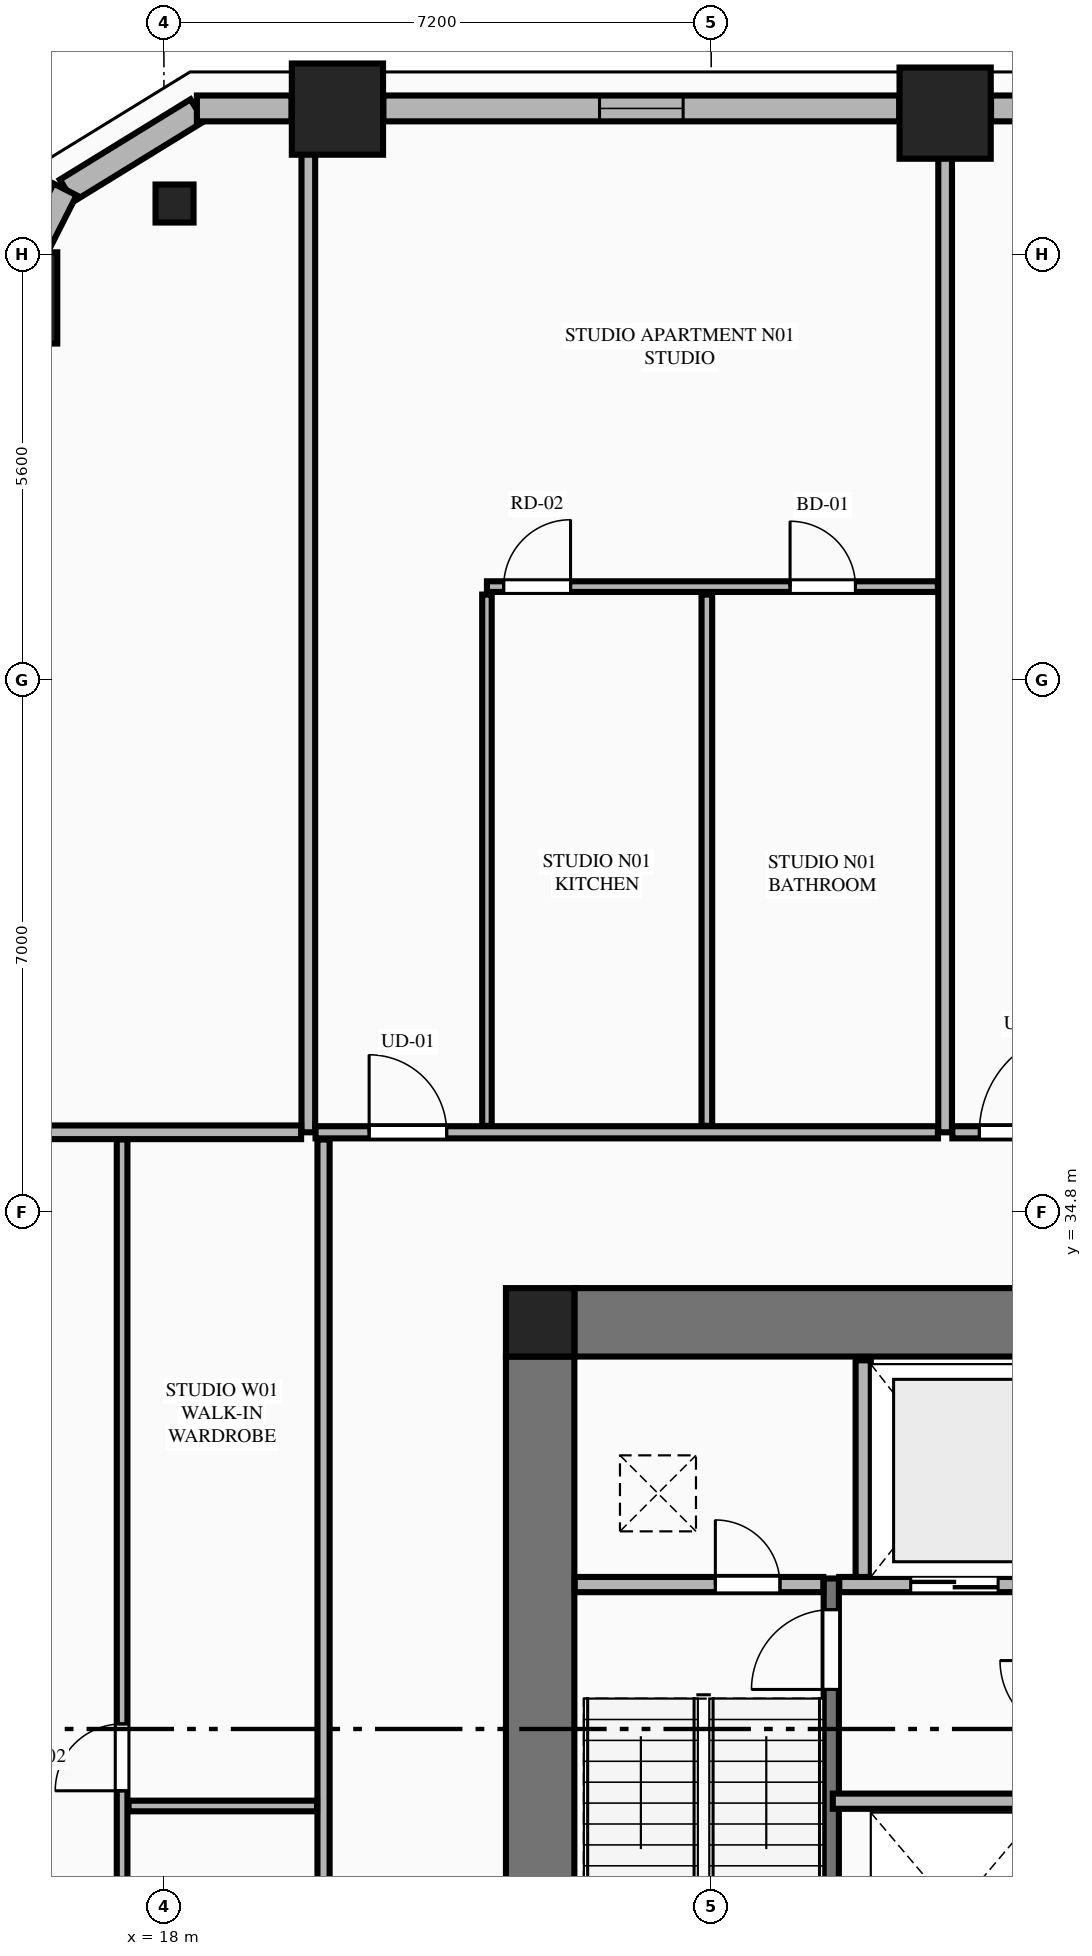
"""IFC4 building model, lengths in metres.
Left out: names, types, materials, properties, quantities, classifications, styles, units other than length and angle.
Written with IfcOpenShell. Run it as: python <this file> out.ifc"""

import sys

from ifc_helpers import new_model, si_unit, direction, frame, frame_2d, origin, origin_2d, place, context, subcontext, project, spatial, rectangle, extrude, element, fill, save


model = new_model("IFC4")
c1 = context("Model", 3, precision=1e-05, world=origin(), true_north=direction((0.0, 1.0)))
c2 = subcontext(c1, "Body", "Model", "MODEL_VIEW")
j1 = project(units=[si_unit("LENGTHUNIT", "METRE"), si_unit("PLANEANGLEUNIT", "RADIAN")], contexts=[c1])
p1 = place(None, origin())
s1 = spatial("IfcSite", under=j1, at=p1, CompositionType="ELEMENT")
p2 = place(p1, origin())
s2 = spatial("IfcBuilding", under=s1, at=p2, CompositionType="ELEMENT")
p3 = place(p2, frame((0.0, 0.0, 60.4)))
s3 = spatial("IfcBuildingStorey", under=s2, at=p3, CompositionType="ELEMENT", Elevation=60.4)
p4 = place(p3, frame((22.95, 33.35, 0.0), z_axis=(0.0, 0.0, 1.0), x_axis=(1.0, 0.0, 0.0)))
e1 = element("IfcColumn", 1, at=p4, inside=s3, PredefinedType="COLUMN", context=c2, shape_type="SweptSolid", body=[
    extrude(rectangle(XDim=0.9, YDim=0.9, at=origin_2d()), origin(), (0.0, 0.0, 1.0), 3.55),
])
p5 = place(p3, frame((23.4, 33.35, 0.0), z_axis=(0.0, 0.0, 1.0), x_axis=(1.0, 0.0, 0.0)))
e2 = element("IfcWall", 2, at=p5, inside=s3, PredefinedType="SHEAR", context=c2, shape_type="SweptSolid", body=[
    extrude(rectangle(XDim=18.0, YDim=0.9, at=frame_2d((9.0, 0.0))), origin(), (0.0, 0.0, 1.0), 3.33),
])
p6 = place(p3, frame((22.95, 18.9, 0.0), z_axis=(0.0, 0.0, 1.0), x_axis=(0.0, 1.0, 0.0)))
e3 = element("IfcWall", 3, at=p6, inside=s3, PredefinedType="SHEAR", context=c2, shape_type="SweptSolid", body=[
    extrude(rectangle(XDim=14.0, YDim=0.9, at=frame_2d((7.0, 0.0))), origin(), (0.0, 0.0, 1.0), 3.33),
])
p7 = place(p6, frame((2.94, 0.0, 0.0)))
e4 = element("IfcOpeningElement", 4, at=p7, cuts=e3, PredefinedType="OPENING", context=c2, shape_type="SweptSolid", body=[
    extrude(rectangle(XDim=1.22, YDim=2.25, at=frame_2d((0.61, 1.125))), frame((0.0, 0.46, 0.0), z_axis=(0.0, -1.0, 0.0), x_axis=(1.0, 0.0, 0.0)), (0.0, 0.0, 1.0), 0.92),
])
for number, where, z_axis, x_axis in (
    (5, (28.278, 49.258, 0.0), (0.0, 0.0, 1.0), (1.0, 0.0, 0.0)),
    (6, (20.283, 49.311, 0.0), (0.0, 0.0, 1.0), (1.0, 0.0, 0.0)),
    (7, (15.997, 46.827, 0.0), (0.0, 0.0, 1.0), (1.0, 0.0, 0.0)),
):
    element("IfcColumn", number, at=place(p3, frame(where, z_axis=z_axis, x_axis=x_axis)), inside=s3, PredefinedType="COLUMN", context=c2, shape_type="SweptSolid", body=[
        extrude(rectangle(XDim=1.2, YDim=1.2, at=origin_2d()), origin(), (0.0, 0.0, 1.0), 3.55),
    ])
p8 = place(p3, frame((18.14, 48.069, 0.0), z_axis=(0.0, 0.0, 1.0), x_axis=(-0.865195182343, -0.501435236546, 0.0)))
e8 = element("IfcColumn", 8, at=p8, inside=s3, PredefinedType="PILASTER", context=c2, shape_type="SweptSolid", body=[
    extrude(rectangle(XDim=0.5, YDim=0.35, at=origin_2d()), origin(), (0.0, 0.0, 1.0), 3.55),
])
p9 = place(p3, frame((26.78, 23.2, 0.0), z_axis=(0.0, 0.0, 1.0), x_axis=(0.0, 1.0, 0.0)))
e9 = element("IfcWall", 9, at=p9, inside=s3, PredefinedType="SHEAR", context=c2, shape_type="SweptSolid", body=[
    extrude(rectangle(XDim=6.78, YDim=0.2, at=frame_2d((3.39, 0.0))), origin(), (0.0, 0.0, 1.0), 3.55),
])
p10 = place(p9, frame((5.32, 0.0, 0.0)))
e10 = element("IfcOpeningElement", 10, at=p10, cuts=e9, PredefinedType="OPENING", context=c2, shape_type="SweptSolid", body=[
    extrude(rectangle(XDim=1.05, YDim=2.15, at=frame_2d((0.525, 1.075))), frame((0.0, 0.11, 0.0), z_axis=(0.0, -1.0, 0.0), x_axis=(1.0, 0.0, 0.0)), (0.0, 0.0, 1.0), 0.22),
])
p11 = place(p3, frame((23.405, 29.9, 0.0), z_axis=(0.0, 0.0, 1.0), x_axis=(1.0, 0.0, 0.0)))
e11 = element("IfcWall", 11, at=p11, inside=s3, PredefinedType="PLUMBINGWALL", context=c2, shape_type="SweptSolid", body=[
    extrude(rectangle(XDim=3.27, YDim=0.2, at=frame_2d((1.635, 0.0))), origin(), (0.0, 0.0, 1.0), 3.33),
])
p12 = place(p11, frame((1.85, 0.0, 0.0)))
e12 = element("IfcOpeningElement", 12, at=p12, cuts=e11, PredefinedType="OPENING", context=c2, shape_type="SweptSolid", body=[
    extrude(rectangle(XDim=0.85, YDim=2.05, at=frame_2d((0.425, 1.025))), frame((0.0, 0.11, 0.0), z_axis=(0.0, -1.0, 0.0), x_axis=(1.0, 0.0, 0.0)), (0.0, 0.0, 1.0), 0.22),
])
p13 = place(p3, frame((26.885, 29.9, 0.0), z_axis=(0.0, 0.0, 1.0), x_axis=(1.0, 0.0, 0.0)))
e13 = element("IfcWall", 13, at=p13, inside=s3, PredefinedType="PLUMBINGWALL", context=c2, shape_type="SweptSolid", body=[
    extrude(rectangle(XDim=3.015, YDim=0.2, at=frame_2d((1.507, 0.0))), origin(), (0.0, 0.0, 1.0), 3.33),
])
p14 = place(p13, frame((0.94, 0.0, 0.0)))
e14 = element("IfcOpeningElement", 14, at=p14, cuts=e13, PredefinedType="OPENING", context=c2, shape_type="SweptSolid", body=[
    extrude(rectangle(XDim=1.15, YDim=2.2, at=frame_2d((0.575, 1.1))), frame((0.0, 0.11, 0.0), z_axis=(0.0, -1.0, 0.0), x_axis=(1.0, 0.0, 0.0)), (0.0, 0.0, 1.0), 0.22),
])
p15 = place(p3, frame((27.2, 30.0, 0.0), z_axis=(0.0, 0.0, 1.0), x_axis=(0.0, 1.0, 0.0)))
e15 = element("IfcWall", 15, at=p15, inside=s3, PredefinedType="PLUMBINGWALL", context=c2, shape_type="SweptSolid", body=[
    extrude(rectangle(XDim=2.85, YDim=0.2, at=frame_2d((1.425, 0.0))), origin(), (0.0, 0.0, 1.0), 3.33),
])
p16 = place(p3, frame((26.8, 27.05, 0.0), z_axis=(0.0, 0.0, 1.0), x_axis=(1.0, 0.0, 0.0)))
e16 = element("IfcWall", 16, at=p16, inside=s3, PredefinedType="PLUMBINGWALL", context=c2, shape_type="SweptSolid", body=[
    extrude(rectangle(XDim=3.2, YDim=0.2, at=frame_2d((1.6, 0.0))), origin(), (0.0, 0.0, 1.0), 3.33),
])
p17 = place(p3, frame((18.439, 49.295, 0.0), z_axis=(0.0, 0.0, 1.0), x_axis=(-0.851870104345, -0.523753114857, 0.0)))
e17 = element("IfcWall", 17, at=p17, inside=s3, PredefinedType="STANDARD", context=c2, shape_type="SweptSolid", body=[
    extrude(rectangle(XDim=2.018, YDim=0.34, at=frame_2d((1.009, 0.0))), origin(), (0.0, 0.0, 1.0), 3.33),
])
p18 = place(p3, frame((35.918, 49.32, 0.0), z_axis=(0.0, 0.0, 1.0), x_axis=(-1.0, 0.0, 0.0)))
e18 = element("IfcWall", 18, at=p18, inside=s3, PredefinedType="STANDARD", context=c2, shape_type="SweptSolid", body=[
    extrude(rectangle(XDim=7.036, YDim=0.34, at=frame_2d((3.518, 0.0))), origin(), (0.0, 0.0, 1.0), 2.787),
])
p19 = place(p18, frame((2.968, 0.0, 0.75)))
e19 = element("IfcOpeningElement", 19, at=p19, cuts=e18, PredefinedType="OPENING", context=c2, shape_type="SweptSolid", body=[
    extrude(rectangle(XDim=1.1, YDim=1.887, at=frame_2d((0.55, 0.943))), frame((0.0, 0.18, 0.0), z_axis=(0.0, -1.0, 0.0), x_axis=(1.0, 0.0, 0.0)), (0.0, 0.0, 1.0), 0.36),
])
p20 = place(p3, frame((27.674, 49.32, 0.0), z_axis=(0.0, 0.0, 1.0), x_axis=(-1.0, 0.0, 0.0)))
e20 = element("IfcWall", 20, at=p20, inside=s3, PredefinedType="STANDARD", context=c2, shape_type="SweptSolid", body=[
    extrude(rectangle(XDim=6.787, YDim=0.34, at=frame_2d((3.394, 0.0))), origin(), (0.0, 0.0, 1.0), 2.787),
])
p21 = place(p20, frame((2.843, 0.0, 0.75)))
e21 = element("IfcOpeningElement", 21, at=p21, cuts=e20, PredefinedType="OPENING", context=c2, shape_type="SweptSolid", body=[
    extrude(rectangle(XDim=1.1, YDim=1.887, at=frame_2d((0.55, 0.943))), frame((0.0, 0.18, 0.0), z_axis=(0.0, -1.0, 0.0), x_axis=(1.0, 0.0, 0.0)), (0.0, 0.0, 1.0), 0.36),
])
p22 = place(p3, frame((19.679, 49.32, 0.0), z_axis=(0.0, 0.0, 1.0), x_axis=(-1.0, 0.0, 0.0)))
e22 = element("IfcWall", 22, at=p22, inside=s3, PredefinedType="STANDARD", context=c2, shape_type="SweptSolid", body=[
    extrude(rectangle(XDim=1.245, YDim=0.34, at=frame_2d((0.623, 0.0))), origin(), (0.0, 0.0, 1.0), 3.33),
])
p23 = place(p3, frame((16.7, 48.254, 0.0), z_axis=(0.0, 0.0, 1.0), x_axis=(-0.451995771866, -0.892020079491, 0.0)))
e23 = element("IfcWall", 23, at=p23, inside=s3, PredefinedType="STANDARD", context=c2, shape_type="SweptSolid", body=[
    extrude(rectangle(XDim=0.836, YDim=0.34, at=frame_2d((0.418, 0.0))), origin(), (0.0, 0.0, 1.0), 3.33),
])
p24 = place(p3, frame((19.9, 35.85, 0.0), z_axis=(0.0, 0.0, 1.0), x_axis=(0.0, 1.0, 0.0)))
e24 = element("IfcWall", 24, at=p24, inside=s3, PredefinedType="PARTITIONING", context=c2, shape_type="SweptSolid", body=[
    extrude(rectangle(XDim=13.295, YDim=0.18, at=frame_2d((6.647, 0.0))), origin(), (0.0, 0.0, 1.0), 3.33),
])
p25 = place(p3, frame((28.278, 35.85, 0.0), z_axis=(0.0, 0.0, 1.0), x_axis=(0.0, 1.0, 0.0)))
e25 = element("IfcWall", 25, at=p25, inside=s3, PredefinedType="PARTITIONING", context=c2, shape_type="SweptSolid", body=[
    extrude(rectangle(XDim=13.295, YDim=0.18, at=frame_2d((6.647, 0.0))), origin(), (0.0, 0.0, 1.0), 2.636),
])
p26 = place(p3, frame((19.995, 35.85, 0.0), z_axis=(0.0, 0.0, 1.0), x_axis=(1.0, 0.0, 0.0)))
e26 = element("IfcWall", 26, at=p26, inside=s3, PredefinedType="PARTITIONING", context=c2, shape_type="SweptSolid", body=[
    extrude(rectangle(XDim=8.188, YDim=0.16, at=frame_2d((4.094, 0.0))), origin(), (0.0, 0.0, 1.0), 3.33),
])
p27 = place(p26, frame((0.705, 0.0, 0.0)))
e27 = element("IfcOpeningElement", 27, at=p27, cuts=e26, PredefinedType="OPENING", context=c2, shape_type="SweptSolid", body=[
    extrude(rectangle(XDim=1.02, YDim=2.25, at=frame_2d((0.51, 1.125))), frame((0.0, 0.09, 0.0), z_axis=(0.0, -1.0, 0.0), x_axis=(1.0, 0.0, 0.0)), (0.0, 0.0, 1.0), 0.18),
])
p28 = place(p3, frame((22.25, 35.935, 0.0), z_axis=(0.0, 0.0, 1.0), x_axis=(0.0, 1.0, 0.0)))
e28 = element("IfcWall", 28, at=p28, inside=s3, PredefinedType="PARTITIONING", context=c2, shape_type="SweptSolid", body=[
    extrude(rectangle(XDim=6.989, YDim=0.125, at=frame_2d((3.495, 0.0))), origin(), (0.0, 0.0, 1.0), 2.636),
])
p29 = place(p3, frame((22.25, 43.029, 0.0), z_axis=(0.0, 0.0, 1.0), x_axis=(1.0, 0.0, 0.0)))
e29 = element("IfcWall", 29, at=p29, inside=s3, PredefinedType="PLUMBINGWALL", context=c2, shape_type="SweptSolid", body=[
    extrude(rectangle(XDim=5.933, YDim=0.14, at=frame_2d((2.967, 0.0))), origin(), (0.0, 0.0, 1.0), 3.33),
])
p30 = place(p29, frame((3.988, 0.0, 0.0)))
e30 = element("IfcOpeningElement", 30, at=p30, cuts=e29, PredefinedType="OPENING", context=c2, shape_type="SweptSolid", body=[
    extrude(rectangle(XDim=0.86, YDim=2.1, at=frame_2d((0.43, 1.05))), frame((0.0, 0.08, 0.0), z_axis=(0.0, -1.0, 0.0), x_axis=(1.0, 0.0, 0.0)), (0.0, 0.0, 1.0), 0.16),
])
p31 = place(p29, frame((0.22, 0.0, 0.0)))
e31 = element("IfcOpeningElement", 31, at=p31, cuts=e29, PredefinedType="OPENING", context=c2, shape_type="SweptSolid", body=[
    extrude(rectangle(XDim=0.88, YDim=2.15, at=frame_2d((0.44, 1.075))), frame((0.0, 0.08, 0.0), z_axis=(0.0, -1.0, 0.0), x_axis=(1.0, 0.0, 0.0)), (0.0, 0.0, 1.0), 0.16),
])
p32 = place(p3, frame((25.143, 35.935, 0.0), z_axis=(0.0, 0.0, 1.0), x_axis=(0.0, 1.0, 0.0)))
e32 = element("IfcWall", 32, at=p32, inside=s3, PredefinedType="PLUMBINGWALL", context=c2, shape_type="SweptSolid", body=[
    extrude(rectangle(XDim=6.989, YDim=0.14, at=frame_2d((3.495, 0.0))), origin(), (0.0, 0.0, 1.0), 3.33),
])
p33 = place(p3, frame((28.373, 35.85, 0.0), z_axis=(0.0, 0.0, 1.0), x_axis=(1.0, 0.0, 0.0)))
e33 = element("IfcWall", 33, at=p33, inside=s3, PredefinedType="PARTITIONING", context=c2, shape_type="SweptSolid", body=[
    extrude(rectangle(XDim=16.432, YDim=0.16, at=frame_2d((8.216, 0.0))), origin(), (0.0, 0.0, 1.0), 3.33),
])
p34 = place(p33, frame((0.355, 0.0, 0.0)))
e34 = element("IfcOpeningElement", 34, at=p34, cuts=e33, PredefinedType="OPENING", context=c2, shape_type="SweptSolid", body=[
    extrude(rectangle(XDim=1.35, YDim=2.35, at=frame_2d((0.675, 1.175))), frame((0.0, 0.09, 0.0), z_axis=(0.0, -1.0, 0.0), x_axis=(1.0, 0.0, 0.0)), (0.0, 0.0, 1.0), 0.18),
])
p35 = place(p3, frame((10.665, 35.85, 0.0), z_axis=(0.0, 0.0, 1.0), x_axis=(1.0, 0.0, 0.0)))
e35 = element("IfcWall", 35, at=p35, inside=s3, PredefinedType="PARTITIONING", context=c2, shape_type="SweptSolid", body=[
    extrude(rectangle(XDim=9.14, YDim=0.18, at=frame_2d((4.57, 0.0))), origin(), (0.0, 0.0, 1.0), 3.33),
])
p36 = place(p3, frame((20.1, 16.045, 0.0), z_axis=(0.0, 0.0, 1.0), x_axis=(0.0, 1.0, 0.0)))
e36 = element("IfcWall", 36, at=p36, inside=s3, PredefinedType="PARTITIONING", context=c2, shape_type="SweptSolid", body=[
    extrude(rectangle(XDim=19.71, YDim=0.16, at=frame_2d((9.855, 0.0))), origin(), (0.0, 0.0, 1.0), 3.33),
])
p37 = place(p36, frame((0.4, 0.0, 0.0)))
e37 = element("IfcOpeningElement", 37, at=p37, cuts=e36, PredefinedType="OPENING", context=c2, shape_type="SweptSolid", body=[
    extrude(rectangle(XDim=1.02, YDim=2.25, at=frame_2d((0.51, 1.125))), frame((0.0, 0.09, 0.0), z_axis=(0.0, -1.0, 0.0), x_axis=(1.0, 0.0, 0.0)), (0.0, 0.0, 1.0), 0.18),
])
p38 = place(p3, frame((17.45, 18.0, 0.0), z_axis=(0.0, 0.0, 1.0), x_axis=(0.0, 1.0, 0.0)))
e38 = element("IfcWall", 38, at=p38, inside=s3, PredefinedType="PLUMBINGWALL", context=c2, shape_type="SweptSolid", body=[
    extrude(rectangle(XDim=17.755, YDim=0.14, at=frame_2d((8.877, 0.0))), origin(), (0.0, 0.0, 1.0), 3.33),
])
p39 = place(p38, frame((3.6, 0.0, 0.0)))
e39 = element("IfcOpeningElement", 39, at=p39, cuts=e38, PredefinedType="OPENING", context=c2, shape_type="SweptSolid", body=[
    extrude(rectangle(XDim=0.86, YDim=2.1, at=frame_2d((0.43, 1.05))), frame((0.0, 0.08, 0.0), z_axis=(0.0, -1.0, 0.0), x_axis=(1.0, 0.0, 0.0)), (0.0, 0.0, 1.0), 0.16),
])
p40 = place(p38, frame((9.187, 0.0, 0.0)))
e40 = element("IfcOpeningElement", 40, at=p40, cuts=e38, PredefinedType="OPENING", context=c2, shape_type="SweptSolid", body=[
    extrude(rectangle(XDim=0.88, YDim=2.15, at=frame_2d((0.44, 1.075))), frame((0.0, 0.08, 0.0), z_axis=(0.0, -1.0, 0.0), x_axis=(1.0, 0.0, 0.0)), (0.0, 0.0, 1.0), 0.16),
])
p41 = place(p38, frame((0.2, 0.0, 0.0)))
e41 = element("IfcOpeningElement", 41, at=p41, cuts=e38, PredefinedType="OPENING", context=c2, shape_type="SweptSolid", body=[
    extrude(rectangle(XDim=0.88, YDim=2.15, at=frame_2d((0.44, 1.075))), frame((0.0, 0.08, 0.0), z_axis=(0.0, -1.0, 0.0), x_axis=(1.0, 0.0, 0.0)), (0.0, 0.0, 1.0), 0.16),
])
p42 = place(p3, frame((17.535, 26.987, 0.0), z_axis=(0.0, 0.0, 1.0), x_axis=(1.0, 0.0, 0.0)))
e42 = element("IfcWall", 42, at=p42, inside=s3, PredefinedType="PLUMBINGWALL", context=c2, shape_type="SweptSolid", body=[
    extrude(rectangle(XDim=2.48, YDim=0.14, at=frame_2d((1.24, 0.0))), origin(), (0.0, 0.0, 1.0), 3.33),
])
p43 = place(p10, origin())
e43 = element("IfcDoor", 43, at=p43, inside=s3, OperationType="SINGLE_SWING_LEFT", PredefinedType="DOOR", context=c2, shape_type="SweptSolid", body=[
    extrude(rectangle(XDim=1.05, YDim=2.15, at=frame_2d((0.525, 1.075))), frame((0.0, 0.025, 0.0), z_axis=(0.0, -1.0, 0.0), x_axis=(1.0, 0.0, 0.0)), (0.0, 0.0, 1.0), 0.05),
])
fill(e10, e43)
p44 = place(p12, origin())
e44 = element("IfcDoor", 44, at=p44, inside=s3, OperationType="SINGLE_SWING_LEFT", PredefinedType="DOOR", context=c2, shape_type="SweptSolid", body=[
    extrude(rectangle(XDim=0.85, YDim=2.05, at=frame_2d((0.425, 1.025))), frame((0.0, 0.025, 0.0), z_axis=(0.0, -1.0, 0.0), x_axis=(1.0, 0.0, 0.0)), (0.0, 0.0, 1.0), 0.05),
])
fill(e12, e44)
p45 = place(p14, origin())
e45 = element("IfcDoor", 45, at=p45, inside=s3, OperationType="DOUBLE_DOOR_SLIDING", PredefinedType="DOOR", context=c2, shape_type="SweptSolid", body=[
    extrude(rectangle(XDim=1.15, YDim=2.2, at=frame_2d((0.575, 1.1))), frame((0.0, 0.025, 0.0), z_axis=(0.0, -1.0, 0.0), x_axis=(1.0, 0.0, 0.0)), (0.0, 0.0, 1.0), 0.05),
])
fill(e14, e45)
p46 = place(p21, origin())
e46 = element("IfcWindow", 46, at=p46, inside=s3, PartitioningType="SINGLE_PANEL", PredefinedType="WINDOW", context=c2, shape_type="SweptSolid", body=[
    extrude(rectangle(XDim=1.1, YDim=1.887, at=frame_2d((0.55, 0.943))), frame((0.0, 0.03, 0.0), z_axis=(0.0, -1.0, 0.0), x_axis=(1.0, 0.0, 0.0)), (0.0, 0.0, 1.0), 0.06),
])
fill(e21, e46)
p47 = place(p30, origin())
e47 = element("IfcDoor", 47, at=p47, inside=s3, OperationType="SINGLE_SWING_LEFT", PredefinedType="DOOR", context=c2, shape_type="SweptSolid", body=[
    extrude(rectangle(XDim=0.86, YDim=2.1, at=frame_2d((0.43, 1.05))), frame((0.0, 0.025, 0.0), z_axis=(0.0, -1.0, 0.0), x_axis=(1.0, 0.0, 0.0)), (0.0, 0.0, 1.0), 0.05),
])
fill(e30, e47)
p48 = place(p27, origin())
e48 = element("IfcDoor", 48, at=p48, inside=s3, OperationType="SINGLE_SWING_LEFT", PredefinedType="DOOR", context=c2, shape_type="SweptSolid", body=[
    extrude(rectangle(XDim=1.02, YDim=2.25, at=frame_2d((0.51, 1.125))), frame((0.0, 0.025, 0.0), z_axis=(0.0, -1.0, 0.0), x_axis=(1.0, 0.0, 0.0)), (0.0, 0.0, 1.0), 0.05),
])
fill(e27, e48)
p49 = place(p31, origin())
e49 = element("IfcDoor", 49, at=p49, inside=s3, OperationType="SINGLE_SWING_RIGHT", PredefinedType="DOOR", context=c2, shape_type="SweptSolid", body=[
    extrude(rectangle(XDim=0.88, YDim=2.15, at=frame_2d((0.44, 1.075))), frame((0.0, 0.025, 0.0), z_axis=(0.0, -1.0, 0.0), x_axis=(1.0, 0.0, 0.0)), (0.0, 0.0, 1.0), 0.05),
])
fill(e31, e49)
p50 = place(p34, origin())
e50 = element("IfcDoor", 50, at=p50, inside=s3, OperationType="SINGLE_SWING_RIGHT", PredefinedType="DOOR", context=c2, shape_type="SweptSolid", body=[
    extrude(rectangle(XDim=1.35, YDim=2.35, at=frame_2d((0.675, 1.175))), frame((0.0, 0.025, 0.0), z_axis=(0.0, -1.0, 0.0), x_axis=(1.0, 0.0, 0.0)), (0.0, 0.0, 1.0), 0.05),
])
fill(e34, e50)
p51 = place(p40, origin())
e51 = element("IfcDoor", 51, at=p51, inside=s3, OperationType="SINGLE_SWING_LEFT", PredefinedType="DOOR", context=c2, shape_type="SweptSolid", body=[
    extrude(rectangle(XDim=0.88, YDim=2.15, at=frame_2d((0.44, 1.075))), frame((0.0, 0.025, 0.0), z_axis=(0.0, -1.0, 0.0), x_axis=(1.0, 0.0, 0.0)), (0.0, 0.0, 1.0), 0.05),
])
fill(e40, e51)
save(model, sys.argv[1])
